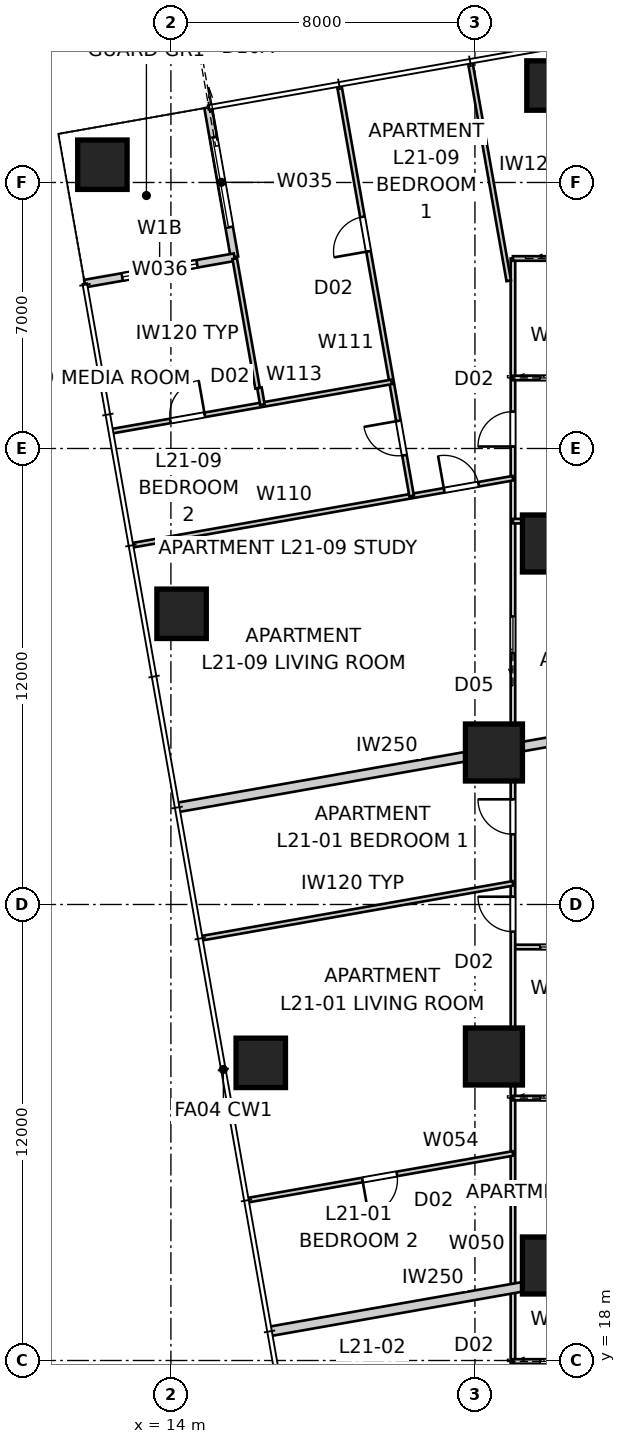
"""IFC4 building model, lengths in metres.
Left out: names, types, materials, properties, quantities, classifications, styles, units other than length and angle.
Written with IfcOpenShell. Run it as: python <this file> out.ifc"""

import sys

from ifc_helpers import new_model, si_unit, direction, frame, frame_2d, origin, origin_2d, place, context, subcontext, project, spatial, rectangle, extrude, element, fill, save


model = new_model("IFC4")
c1 = context("Model", 3, precision=1e-05, world=origin(), true_north=direction((0.0, 1.0)))
c2 = subcontext(c1, "Body", "Model", "MODEL_VIEW")
j1 = project(units=[si_unit("LENGTHUNIT", "METRE"), si_unit("PLANEANGLEUNIT", "RADIAN")], contexts=[c1])
p1 = place(None, origin())
s1 = spatial("IfcSite", under=j1, at=p1, CompositionType="ELEMENT")
p2 = place(p1, origin())
s2 = spatial("IfcBuilding", under=s1, at=p2, CompositionType="ELEMENT")
p3 = place(p2, frame((0.0, 0.0, 79.4)))
s3 = spatial("IfcBuildingStorey", under=s2, at=p3, CompositionType="ELEMENT", Elevation=79.4)
for number, where, z_axis, x_axis in (
    (1, (24.015, 51.552, -0.15), (0.0, 0.0, 1.0), (1.0, 0.0, 0.0)),
    (2, (12.197, 49.468, -0.15), (0.0, 0.0, 1.0), (1.0, 0.0, 0.0)),
    (3, (14.281, 37.65, -0.15), (0.0, 0.0, 1.0), (1.0, 0.0, 0.0)),
    (4, (16.365, 25.833, -0.15), (0.0, 0.0, 1.0), (1.0, 0.0, 0.0)),
):
    element("IfcColumn", number, at=place(p3, frame(where, z_axis=z_axis, x_axis=x_axis)), inside=s3, PredefinedType="COLUMN", context=c2, shape_type="SweptSolid", body=[
        extrude(rectangle(XDim=1.3, YDim=1.3, at=origin_2d()), origin(), (0.0, 0.0, 1.0), 3.55),
    ])
for number, where, z_axis, x_axis in (
    (5, (24.0, 39.5, 0.0), (0.0, 0.0, 1.0), (1.0, 0.0, 0.0)),
    (6, (22.5, 34.0, 0.0), (0.0, 0.0, 1.0), (1.0, 0.0, 0.0)),
    (7, (22.5, 26.0, 0.0), (0.0, 0.0, 1.0), (1.0, 0.0, 0.0)),
    (8, (24.0, 20.5, 0.0), (0.0, 0.0, 1.0), (1.0, 0.0, 0.0)),
):
    element("IfcColumn", number, at=place(p3, frame(where, z_axis=z_axis, x_axis=x_axis)), inside=s3, PredefinedType="COLUMN", context=c2, shape_type="SweptSolid", body=[
        extrude(rectangle(XDim=1.5, YDim=1.5, at=origin_2d()), origin(), (0.0, 0.0, 1.0), 3.4),
    ])
p4 = place(p3, frame((14.978, 50.974, 0.0), z_axis=(0.0, 0.0, 1.0), x_axis=(0.173646056486, -0.984808127031, 0.0)))
e9 = element("IfcWall", 9, at=p4, inside=s3, PredefinedType="SOLIDWALL", context=c2, shape_type="SweptSolid", body=[
    extrude(rectangle(XDim=4.0, YDim=0.2, at=frame_2d((2.0, 0.0))), origin(), (0.0, 0.0, 1.0), 3.25),
])
p5 = place(p4, frame((0.8, 0.0, 0.0)))
e10 = element("IfcOpeningElement", 10, at=p5, cuts=e9, PredefinedType="OPENING", context=c2, shape_type="SweptSolid", body=[
    extrude(rectangle(XDim=2.4, YDim=2.1, at=frame_2d((1.2, 1.05))), frame((0.0, 0.11, 0.0), z_axis=(0.0, -1.0, 0.0), x_axis=(1.0, 0.0, 0.0)), (0.0, 0.0, 1.0), 0.22),
])
p6 = place(p3, frame((15.672, 47.034, 0.0), z_axis=(0.0, 0.0, 1.0), x_axis=(-0.984808127031, -0.173646056486, 0.0)))
e11 = element("IfcWall", 11, at=p6, inside=s3, PredefinedType="SOLIDWALL", context=c2, shape_type="SweptSolid", body=[
    extrude(rectangle(XDim=4.0, YDim=0.2, at=frame_2d((2.0, 0.0))), origin(), (0.0, 0.0, 1.0), 3.25),
])
p7 = place(p6, frame((1.0, 0.0, 0.45)))
e12 = element("IfcOpeningElement", 12, at=p7, cuts=e11, PredefinedType="OPENING", context=c2, shape_type="SweptSolid", body=[
    extrude(rectangle(XDim=2.0, YDim=1.8, at=frame_2d((1.0, 0.9))), frame((0.0, 0.11, 0.0), z_axis=(0.0, -1.0, 0.0), x_axis=(1.0, 0.0, 0.0)), (0.0, 0.0, 1.0), 0.22),
])
p8 = place(p3, frame((14.164, 32.552, 0.0), z_axis=(0.0, 0.0, 1.0), x_axis=(0.98481000304, 0.173635416642, 0.0)))
e13 = element("IfcWall", 13, at=p8, inside=s3, PredefinedType="PARTITIONING", context=c2, shape_type="SweptSolid", body=[
    extrude(rectangle(XDim=11.427, YDim=0.25, at=frame_2d((5.713, 0.0))), origin(), (0.0, 0.0, 1.0), 3.25),
])
p9 = place(p3, frame((16.595, 18.765, 0.0), z_axis=(0.0, 0.0, 1.0), x_axis=(0.984806596137, 0.173654738504, 0.0)))
e14 = element("IfcWall", 14, at=p9, inside=s3, PredefinedType="PARTITIONING", context=c2, shape_type="SweptSolid", body=[
    extrude(rectangle(XDim=8.958, YDim=0.25, at=frame_2d((4.479, 0.0))), origin(), (0.0, 0.0, 1.0), 3.25),
])
p10 = place(p3, frame((25.4, 28.882, 0.0), z_axis=(0.0, 0.0, 1.0), x_axis=(-1.0, 0.0, 0.0)))
e15 = element("IfcWall", 15, at=p10, inside=s3, PredefinedType="PARTITIONING", context=c2, shape_type="SweptSolid", body=[
    extrude(rectangle(XDim=2.4, YDim=0.12, at=frame_2d((1.2, 0.0))), origin(), (0.0, 0.0, 1.0), 3.25),
])
p11 = place(p10, frame((0.72, 0.0, 0.0)))
e16 = element("IfcOpeningElement", 16, at=p11, cuts=e15, PredefinedType="OPENING", context=c2, shape_type="SweptSolid", body=[
    extrude(rectangle(XDim=0.96, YDim=2.1, at=frame_2d((0.48, 1.05))), frame((0.0, 0.07, 0.0), z_axis=(0.0, -1.0, 0.0), x_axis=(1.0, 0.0, 0.0)), (0.0, 0.0, 1.0), 0.14),
])
p12 = place(p3, frame((23.0, 13.0, 0.0), z_axis=(0.0, 0.0, 1.0), x_axis=(0.0, 1.0, 0.0)))
e17 = element("IfcWall", 17, at=p12, inside=s3, PredefinedType="PARTITIONING", context=c2, shape_type="SweptSolid", body=[
    extrude(rectangle(XDim=34.0, YDim=0.12, at=frame_2d((17.0, 0.0))), origin(), (0.0, 0.0, 1.0), 2.55),
])
p13 = place(p12, frame((18.848, 0.0, 0.0)))
e18 = element("IfcOpeningElement", 18, at=p13, cuts=e17, PredefinedType="OPENING", context=c2, shape_type="SweptSolid", body=[
    extrude(rectangle(XDim=0.92, YDim=2.34, at=frame_2d((0.46, 1.17))), frame((0.0, 0.07, 0.0), z_axis=(0.0, -1.0, 0.0), x_axis=(1.0, 0.0, 0.0)), (0.0, 0.0, 1.0), 0.14),
])
p14 = place(p12, frame((16.284, 0.0, 0.0)))
e19 = element("IfcOpeningElement", 19, at=p14, cuts=e17, PredefinedType="OPENING", context=c2, shape_type="SweptSolid", body=[
    extrude(rectangle(XDim=0.92, YDim=2.34, at=frame_2d((0.46, 1.17))), frame((0.0, 0.07, 0.0), z_axis=(0.0, -1.0, 0.0), x_axis=(1.0, 0.0, 0.0)), (0.0, 0.0, 1.0), 0.14),
])
p15 = place(p12, frame((29.052, 0.0, 0.0)))
e20 = element("IfcOpeningElement", 20, at=p15, cuts=e17, PredefinedType="OPENING", context=c2, shape_type="SweptSolid", body=[
    extrude(rectangle(XDim=0.92, YDim=2.34, at=frame_2d((0.46, 1.17))), frame((0.0, 0.07, 0.0), z_axis=(0.0, -1.0, 0.0), x_axis=(1.0, 0.0, 0.0)), (0.0, 0.0, 1.0), 0.14),
])
p16 = place(p12, frame((1.196, 0.0, 0.0)))
e21 = element("IfcOpeningElement", 21, at=p16, cuts=e17, PredefinedType="OPENING", context=c2, shape_type="SweptSolid", body=[
    extrude(rectangle(XDim=0.92, YDim=2.34, at=frame_2d((0.46, 1.17))), frame((0.0, 0.07, 0.0), z_axis=(0.0, -1.0, 0.0), x_axis=(1.0, 0.0, 0.0)), (0.0, 0.0, 1.0), 0.14),
])
p17 = place(p12, frame((3.633, 0.0, 0.0)))
e22 = element("IfcOpeningElement", 22, at=p17, cuts=e17, PredefinedType="OPENING", context=c2, shape_type="SweptSolid", body=[
    extrude(rectangle(XDim=0.92, YDim=2.34, at=frame_2d((0.46, 1.17))), frame((0.0, 0.07, 0.0), z_axis=(0.0, -1.0, 0.0), x_axis=(1.0, 0.0, 0.0)), (0.0, 0.0, 1.0), 0.14),
])
p18 = place(p12, frame((23.619, 0.0, 0.0)))
e23 = element("IfcOpeningElement", 23, at=p18, cuts=e17, PredefinedType="OPENING", context=c2, shape_type="SweptSolid", body=[
    extrude(rectangle(XDim=0.96, YDim=2.1, at=frame_2d((0.48, 1.05))), frame((0.0, 0.07, 0.0), z_axis=(0.0, -1.0, 0.0), x_axis=(1.0, 0.0, 0.0)), (0.0, 0.0, 1.0), 0.14),
])
p19 = place(p3, frame((23.0, 24.905, 0.0), z_axis=(0.0, 0.0, 1.0), x_axis=(1.0, 0.0, 0.0)))
e24 = element("IfcWall", 24, at=p19, inside=s3, PredefinedType="PARTITIONING", context=c2, shape_type="SweptSolid", body=[
    extrude(rectangle(XDim=2.4, YDim=0.12, at=frame_2d((1.2, 0.0))), origin(), (0.0, 0.0, 1.0), 3.25),
])
p20 = place(p19, frame((0.72, 0.0, 0.0)))
e25 = element("IfcOpeningElement", 25, at=p20, cuts=e24, PredefinedType="OPENING", context=c2, shape_type="SweptSolid", body=[
    extrude(rectangle(XDim=0.96, YDim=2.1, at=frame_2d((0.48, 1.05))), frame((0.0, 0.07, 0.0), z_axis=(0.0, -1.0, 0.0), x_axis=(1.0, 0.0, 0.0)), (0.0, 0.0, 1.0), 0.14),
])
p21 = place(p3, frame((14.812, 29.113, 0.0), z_axis=(0.0, 0.0, 1.0), x_axis=(0.984807787824, 0.173647980238, 0.0)))
e26 = element("IfcWall", 26, at=p21, inside=s3, PredefinedType="PARTITIONING", context=c2, shape_type="SweptSolid", body=[
    extrude(rectangle(XDim=8.315, YDim=0.12, at=frame_2d((4.157, 0.0))), origin(), (0.0, 0.0, 1.0), 3.25),
])
p22 = place(p3, frame((23.0, 23.448, 0.0), z_axis=(0.0, 0.0, 1.0), x_axis=(-0.984809234282, -0.173639776761, 0.0)))
e27 = element("IfcWall", 27, at=p22, inside=s3, PredefinedType="PARTITIONING", context=c2, shape_type="SweptSolid", body=[
    extrude(rectangle(XDim=7.081, YDim=0.12, at=frame_2d((3.541, 0.0))), origin(), (0.0, 0.0, 1.0), 3.25),
])
p23 = place(p22, frame((3.1, 0.0, 0.0)))
e28 = element("IfcOpeningElement", 28, at=p23, cuts=e27, PredefinedType="OPENING", context=c2, shape_type="SweptSolid", body=[
    extrude(rectangle(XDim=0.92, YDim=2.34, at=frame_2d((0.46, 1.17))), frame((0.0, 0.07, 0.0), z_axis=(0.0, -1.0, 0.0), x_axis=(1.0, 0.0, 0.0)), (0.0, 0.0, 1.0), 0.14),
])
p24 = place(p3, frame((23.0, 17.975, 0.0), z_axis=(0.0, 0.0, 1.0), x_axis=(1.0, 0.0, 0.0)))
e29 = element("IfcWall", 29, at=p24, inside=s3, PredefinedType="PARTITIONING", context=c2, shape_type="SweptSolid", body=[
    extrude(rectangle(XDim=2.4, YDim=0.12, at=frame_2d((1.2, 0.0))), origin(), (0.0, 0.0, 1.0), 3.25),
])
p25 = place(p24, frame((0.72, 0.0, 0.0)))
e30 = element("IfcOpeningElement", 30, at=p25, cuts=e29, PredefinedType="OPENING", context=c2, shape_type="SweptSolid", body=[
    extrude(rectangle(XDim=0.96, YDim=2.1, at=frame_2d((0.48, 1.05))), frame((0.0, 0.07, 0.0), z_axis=(0.0, -1.0, 0.0), x_axis=(1.0, 0.0, 0.0)), (0.0, 0.0, 1.0), 0.14),
])
p26 = place(p3, frame((23.0, 47.0, 0.0), z_axis=(0.0, 0.0, 1.0), x_axis=(1.0, 0.0, 0.0)))
e31 = element("IfcWall", 31, at=p26, inside=s3, PredefinedType="PARTITIONING", context=c2, shape_type="SweptSolid", body=[
    extrude(rectangle(XDim=24.771, YDim=0.12, at=frame_2d((12.386, 0.0))), origin(), (0.0, 0.0, 1.0), 2.55),
])
p27 = place(p26, frame((21.825, 0.0, 0.0)))
e32 = element("IfcOpeningElement", 32, at=p27, cuts=e31, PredefinedType="OPENING", context=c2, shape_type="SweptSolid", body=[
    extrude(rectangle(XDim=0.92, YDim=2.34, at=frame_2d((0.46, 1.17))), frame((0.0, 0.07, 0.0), z_axis=(0.0, -1.0, 0.0), x_axis=(1.0, 0.0, 0.0)), (0.0, 0.0, 1.0), 0.14),
])
p28 = place(p26, frame((11.135, 0.0, 0.0)))
e33 = element("IfcOpeningElement", 33, at=p28, cuts=e31, PredefinedType="OPENING", context=c2, shape_type="SweptSolid", body=[
    extrude(rectangle(XDim=0.96, YDim=2.1, at=frame_2d((0.48, 1.05))), frame((0.0, 0.07, 0.0), z_axis=(0.0, -1.0, 0.0), x_axis=(1.0, 0.0, 0.0)), (0.0, 0.0, 1.0), 0.14),
])
p29 = place(p26, frame((1.19, 0.0, 0.0)))
e34 = element("IfcOpeningElement", 34, at=p29, cuts=e31, PredefinedType="OPENING", context=c2, shape_type="SweptSolid", body=[
    extrude(rectangle(XDim=0.96, YDim=2.1, at=frame_2d((0.48, 1.05))), frame((0.0, 0.07, 0.0), z_axis=(0.0, -1.0, 0.0), x_axis=(1.0, 0.0, 0.0)), (0.0, 0.0, 1.0), 0.14),
])
p30 = place(p26, frame((8.342, 0.0, 0.0)))
e35 = element("IfcOpeningElement", 35, at=p30, cuts=e31, PredefinedType="OPENING", context=c2, shape_type="SweptSolid", body=[
    extrude(rectangle(XDim=0.96, YDim=2.1, at=frame_2d((0.48, 1.05))), frame((0.0, 0.07, 0.0), z_axis=(0.0, -1.0, 0.0), x_axis=(1.0, 0.0, 0.0)), (0.0, 0.0, 1.0), 0.14),
])
p31 = place(p26, frame((4.663, 0.0, 0.0)))
e36 = element("IfcOpeningElement", 36, at=p31, cuts=e31, PredefinedType="OPENING", context=c2, shape_type="SweptSolid", body=[
    extrude(rectangle(XDim=0.96, YDim=2.1, at=frame_2d((0.48, 1.05))), frame((0.0, 0.07, 0.0), z_axis=(0.0, -1.0, 0.0), x_axis=(1.0, 0.0, 0.0)), (0.0, 0.0, 1.0), 0.14),
])
p32 = place(p3, frame((25.4, 40.088, 0.0), z_axis=(0.0, 0.0, 1.0), x_axis=(-1.0, 0.0, 0.0)))
e37 = element("IfcWall", 37, at=p32, inside=s3, PredefinedType="PARTITIONING", context=c2, shape_type="SweptSolid", body=[
    extrude(rectangle(XDim=2.4, YDim=0.12, at=frame_2d((1.2, 0.0))), origin(), (0.0, 0.0, 1.0), 3.25),
])
p33 = place(p3, frame((23.0, 43.856, 0.0), z_axis=(0.0, 0.0, 1.0), x_axis=(1.0, 0.0, 0.0)))
e38 = element("IfcWall", 38, at=p33, inside=s3, PredefinedType="PARTITIONING", context=c2, shape_type="SweptSolid", body=[
    extrude(rectangle(XDim=2.4, YDim=0.12, at=frame_2d((1.2, 0.0))), origin(), (0.0, 0.0, 1.0), 3.25),
])
p34 = place(p33, frame((0.72, 0.0, 0.0)))
e39 = element("IfcOpeningElement", 39, at=p34, cuts=e38, PredefinedType="OPENING", context=c2, shape_type="SweptSolid", body=[
    extrude(rectangle(XDim=0.96, YDim=2.1, at=frame_2d((0.48, 1.05))), frame((0.0, 0.07, 0.0), z_axis=(0.0, -1.0, 0.0), x_axis=(1.0, 0.0, 0.0)), (0.0, 0.0, 1.0), 0.14),
])
p35 = place(p3, frame((12.988, 39.453, 0.0), z_axis=(0.0, 0.0, 1.0), x_axis=(0.984807724889, 0.173648337162, 0.0)))
e40 = element("IfcWall", 40, at=p35, inside=s3, PredefinedType="PARTITIONING", context=c2, shape_type="SweptSolid", body=[
    extrude(rectangle(XDim=10.167, YDim=0.12, at=frame_2d((5.083, 0.0))), origin(), (0.0, 0.0, 1.0), 2.638),
])
p36 = place(p35, frame((8.328, 0.0, 0.0)))
e41 = element("IfcOpeningElement", 41, at=p36, cuts=e40, PredefinedType="OPENING", context=c2, shape_type="SweptSolid", body=[
    extrude(rectangle(XDim=0.92, YDim=2.34, at=frame_2d((0.46, 1.17))), frame((0.0, 0.07, 0.0), z_axis=(0.0, -1.0, 0.0), x_axis=(1.0, 0.0, 0.0)), (0.0, 0.0, 1.0), 0.14),
])
p37 = place(p3, frame((20.335, 40.749, 0.0), z_axis=(0.0, 0.0, 1.0), x_axis=(-0.173639194339, 0.984809336973, 0.0)))
e42 = element("IfcWall", 42, at=p37, inside=s3, PredefinedType="PARTITIONING", context=c2, shape_type="SweptSolid", body=[
    extrude(rectangle(XDim=10.96, YDim=0.12, at=frame_2d((5.48, 0.0))), origin(), (0.0, 0.0, 1.0), 3.25),
])
p38 = place(p37, frame((6.54, 0.0, 0.0)))
e43 = element("IfcOpeningElement", 43, at=p38, cuts=e42, PredefinedType="OPENING", context=c2, shape_type="SweptSolid", body=[
    extrude(rectangle(XDim=0.92, YDim=2.34, at=frame_2d((0.46, 1.17))), frame((0.0, 0.07, 0.0), z_axis=(0.0, -1.0, 0.0), x_axis=(1.0, 0.0, 0.0)), (0.0, 0.0, 1.0), 0.14),
])
p39 = place(p37, frame((1.09, 0.0, 0.0)))
e44 = element("IfcOpeningElement", 44, at=p39, cuts=e42, PredefinedType="OPENING", context=c2, shape_type="SweptSolid", body=[
    extrude(rectangle(XDim=0.92, YDim=2.34, at=frame_2d((0.46, 1.17))), frame((0.0, 0.07, 0.0), z_axis=(0.0, -1.0, 0.0), x_axis=(1.0, 0.0, 0.0)), (0.0, 0.0, 1.0), 0.14),
])
p40 = place(p3, frame((21.878, 52.15, 0.0), z_axis=(0.0, 0.0, 1.0), x_axis=(0.173634707655, -0.984810128044, 0.0)))
e45 = element("IfcWall", 45, at=p40, inside=s3, PredefinedType="PARTITIONING", context=c2, shape_type="SweptSolid", body=[
    extrude(rectangle(XDim=5.825, YDim=0.12, at=frame_2d((2.913, 0.0))), origin(), (0.0, 0.0, 1.0), 2.638),
])
p41 = place(p3, frame((12.458, 42.457, 0.0), z_axis=(0.0, 0.0, 1.0), x_axis=(0.984807929323, 0.173647177755, 0.0)))
e46 = element("IfcWall", 46, at=p41, inside=s3, PredefinedType="PARTITIONING", context=c2, shape_type="SweptSolid", body=[
    extrude(rectangle(XDim=7.46, YDim=0.12, at=frame_2d((3.73, 0.0))), origin(), (0.0, 0.0, 1.0), 3.25),
])
p42 = place(p41, frame((1.55, 0.0, 0.0)))
e47 = element("IfcOpeningElement", 47, at=p42, cuts=e46, PredefinedType="OPENING", context=c2, shape_type="SweptSolid", body=[
    extrude(rectangle(XDim=0.92, YDim=2.34, at=frame_2d((0.46, 1.17))), frame((0.0, 0.07, 0.0), z_axis=(0.0, -1.0, 0.0), x_axis=(1.0, 0.0, 0.0)), (0.0, 0.0, 1.0), 0.14),
])
p43 = place(p3, frame((16.408, 43.153, 0.0), z_axis=(0.0, 0.0, 1.0), x_axis=(-0.173630564586, 0.984810858511, 0.0)))
e48 = element("IfcWall", 48, at=p43, inside=s3, PredefinedType="PARTITIONING", context=c2, shape_type="SweptSolid", body=[
    extrude(rectangle(XDim=0.45, YDim=0.12, at=frame_2d((0.225, 0.0))), origin(), (0.0, 0.0, 1.0), 3.25),
])
p44 = place(p3, frame((16.28, 43.588, 0.0), z_axis=(0.0, 0.0, 1.0), x_axis=(-0.173660541335, 0.984805572884, 0.0)))
e49 = element("IfcWall", 49, at=p44, inside=s3, PredefinedType="PARTITIONING", context=c2, shape_type="SweptSolid", body=[
    extrude(rectangle(XDim=3.46, YDim=0.12, at=frame_2d((1.73, 0.0))), origin(), (0.0, 0.0, 1.0), 3.25),
])
p45 = place(p5, origin())
e50 = element("IfcDoor", 50, at=p45, inside=s3, OperationType="SLIDING_TO_LEFT", PredefinedType="DOOR", context=c2, shape_type="SweptSolid", body=[
    extrude(rectangle(XDim=2.4, YDim=2.1, at=frame_2d((1.2, 1.05))), frame((0.0, 0.025, 0.0), z_axis=(0.0, -1.0, 0.0), x_axis=(1.0, 0.0, 0.0)), (0.0, 0.0, 1.0), 0.05),
])
fill(e10, e50)
p46 = place(p7, origin())
e51 = element("IfcWindow", 51, at=p46, inside=s3, PartitioningType="SINGLE_PANEL", PredefinedType="WINDOW", context=c2, shape_type="SweptSolid", body=[
    extrude(rectangle(XDim=2.0, YDim=1.8, at=frame_2d((1.0, 0.9))), frame((0.0, 0.03, 0.0), z_axis=(0.0, -1.0, 0.0), x_axis=(1.0, 0.0, 0.0)), (0.0, 0.0, 1.0), 0.06),
])
fill(e12, e51)
p47 = place(p13, origin())
e52 = element("IfcDoor", 52, at=p47, inside=s3, OperationType="SINGLE_SWING_RIGHT", PredefinedType="DOOR", context=c2, shape_type="SweptSolid", body=[
    extrude(rectangle(XDim=0.92, YDim=2.34, at=frame_2d((0.46, 1.17))), frame((0.0, 0.025, 0.0), z_axis=(0.0, -1.0, 0.0), x_axis=(1.0, 0.0, 0.0)), (0.0, 0.0, 1.0), 0.05),
])
fill(e18, e52)
p48 = place(p11, origin())
e53 = element("IfcDoor", 53, at=p48, inside=s3, OperationType="SLIDING_TO_LEFT", PredefinedType="DOOR", context=c2, shape_type="SweptSolid", body=[
    extrude(rectangle(XDim=0.96, YDim=2.1, at=frame_2d((0.48, 1.05))), frame((0.0, 0.025, 0.0), z_axis=(0.0, -1.0, 0.0), x_axis=(1.0, 0.0, 0.0)), (0.0, 0.0, 1.0), 0.05),
])
fill(e16, e53)
p49 = place(p14, origin())
e54 = element("IfcDoor", 54, at=p49, inside=s3, OperationType="SINGLE_SWING_RIGHT", PredefinedType="DOOR", context=c2, shape_type="SweptSolid", body=[
    extrude(rectangle(XDim=0.92, YDim=2.34, at=frame_2d((0.46, 1.17))), frame((0.0, 0.025, 0.0), z_axis=(0.0, -1.0, 0.0), x_axis=(1.0, 0.0, 0.0)), (0.0, 0.0, 1.0), 0.05),
])
fill(e19, e54)
p50 = place(p15, origin())
e55 = element("IfcDoor", 55, at=p50, inside=s3, OperationType="SINGLE_SWING_LEFT", PredefinedType="DOOR", context=c2, shape_type="SweptSolid", body=[
    extrude(rectangle(XDim=0.92, YDim=2.34, at=frame_2d((0.46, 1.17))), frame((0.0, 0.025, 0.0), z_axis=(0.0, -1.0, 0.0), x_axis=(1.0, 0.0, 0.0)), (0.0, 0.0, 1.0), 0.05),
])
fill(e20, e55)
p51 = place(p34, origin())
e56 = element("IfcDoor", 56, at=p51, inside=s3, OperationType="SLIDING_TO_LEFT", PredefinedType="DOOR", context=c2, shape_type="SweptSolid", body=[
    extrude(rectangle(XDim=0.96, YDim=2.1, at=frame_2d((0.48, 1.05))), frame((0.0, 0.025, 0.0), z_axis=(0.0, -1.0, 0.0), x_axis=(1.0, 0.0, 0.0)), (0.0, 0.0, 1.0), 0.05),
])
fill(e39, e56)
p52 = place(p25, origin())
e57 = element("IfcDoor", 57, at=p52, inside=s3, OperationType="SLIDING_TO_LEFT", PredefinedType="DOOR", context=c2, shape_type="SweptSolid", body=[
    extrude(rectangle(XDim=0.96, YDim=2.1, at=frame_2d((0.48, 1.05))), frame((0.0, 0.025, 0.0), z_axis=(0.0, -1.0, 0.0), x_axis=(1.0, 0.0, 0.0)), (0.0, 0.0, 1.0), 0.05),
])
fill(e30, e57)
p53 = place(p20, origin())
e58 = element("IfcDoor", 58, at=p53, inside=s3, OperationType="SLIDING_TO_LEFT", PredefinedType="DOOR", context=c2, shape_type="SweptSolid", body=[
    extrude(rectangle(XDim=0.96, YDim=2.1, at=frame_2d((0.48, 1.05))), frame((0.0, 0.025, 0.0), z_axis=(0.0, -1.0, 0.0), x_axis=(1.0, 0.0, 0.0)), (0.0, 0.0, 1.0), 0.05),
])
fill(e25, e58)
p54 = place(p23, origin())
e59 = element("IfcDoor", 59, at=p54, inside=s3, OperationType="SINGLE_SWING_RIGHT", PredefinedType="DOOR", context=c2, shape_type="SweptSolid", body=[
    extrude(rectangle(XDim=0.92, YDim=2.34, at=frame_2d((0.46, 1.17))), frame((0.0, 0.025, 0.0), z_axis=(0.0, -1.0, 0.0), x_axis=(1.0, 0.0, 0.0)), (0.0, 0.0, 1.0), 0.05),
])
fill(e28, e59)
p55 = place(p38, origin())
e60 = element("IfcDoor", 60, at=p55, inside=s3, OperationType="SINGLE_SWING_LEFT", PredefinedType="DOOR", context=c2, shape_type="SweptSolid", body=[
    extrude(rectangle(XDim=0.92, YDim=2.34, at=frame_2d((0.46, 1.17))), frame((0.0, 0.025, 0.0), z_axis=(0.0, -1.0, 0.0), x_axis=(1.0, 0.0, 0.0)), (0.0, 0.0, 1.0), 0.05),
])
fill(e43, e60)
p56 = place(p39, origin())
e61 = element("IfcDoor", 61, at=p56, inside=s3, OperationType="SINGLE_SWING_RIGHT", PredefinedType="DOOR", context=c2, shape_type="SweptSolid", body=[
    extrude(rectangle(XDim=0.92, YDim=2.34, at=frame_2d((0.46, 1.17))), frame((0.0, 0.025, 0.0), z_axis=(0.0, -1.0, 0.0), x_axis=(1.0, 0.0, 0.0)), (0.0, 0.0, 1.0), 0.05),
])
fill(e44, e61)
p57 = place(p36, origin())
e62 = element("IfcDoor", 62, at=p57, inside=s3, OperationType="SINGLE_SWING_LEFT", PredefinedType="DOOR", context=c2, shape_type="SweptSolid", body=[
    extrude(rectangle(XDim=0.92, YDim=2.34, at=frame_2d((0.46, 1.17))), frame((0.0, 0.025, 0.0), z_axis=(0.0, -1.0, 0.0), x_axis=(1.0, 0.0, 0.0)), (0.0, 0.0, 1.0), 0.05),
])
fill(e41, e62)
p58 = place(p18, origin())
e63 = element("IfcDoor", 63, at=p58, inside=s3, OperationType="SLIDING_TO_LEFT", PredefinedType="DOOR", context=c2, shape_type="SweptSolid", body=[
    extrude(rectangle(XDim=0.96, YDim=2.1, at=frame_2d((0.48, 1.05))), frame((0.0, 0.025, 0.0), z_axis=(0.0, -1.0, 0.0), x_axis=(1.0, 0.0, 0.0)), (0.0, 0.0, 1.0), 0.05),
])
fill(e23, e63)
p59 = place(p42, origin())
e64 = element("IfcDoor", 64, at=p59, inside=s3, OperationType="SINGLE_SWING_RIGHT", PredefinedType="DOOR", context=c2, shape_type="SweptSolid", body=[
    extrude(rectangle(XDim=0.92, YDim=2.34, at=frame_2d((0.46, 1.17))), frame((0.0, 0.025, 0.0), z_axis=(0.0, -1.0, 0.0), x_axis=(1.0, 0.0, 0.0)), (0.0, 0.0, 1.0), 0.05),
])
fill(e47, e64)
save(model, sys.argv[1])
